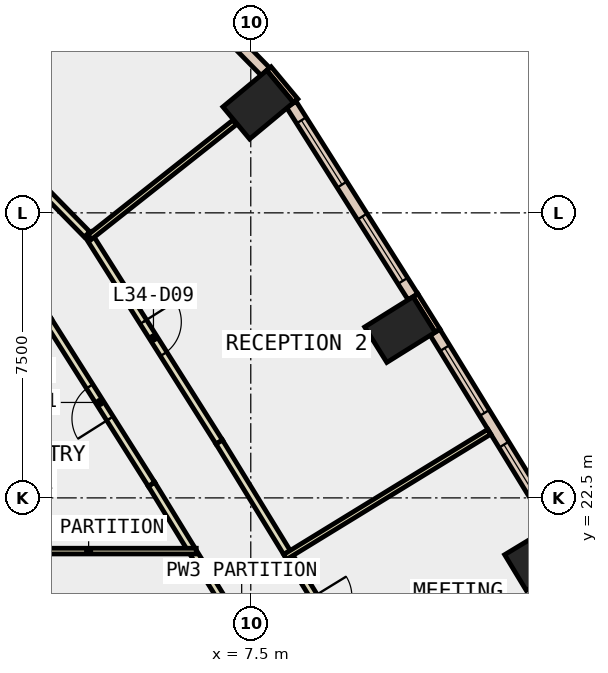
"""IFC4 building model, lengths in metres.
Left out: names, types, materials, properties, quantities, classifications, styles, units other than length and angle.
Written with IfcOpenShell. Run it as: python <this file> out.ifc"""

import sys

from ifc_helpers import new_model, si_unit, direction, frame, frame_2d, origin, origin_2d, place, context, subcontext, project, spatial, rectangle, extrude, element, fill, save


model = new_model("IFC4")
c1 = context("Model", 3, precision=1e-05, world=origin(), true_north=direction((0.0, 1.0)))
c2 = subcontext(c1, "Body", "Model", "MODEL_VIEW")
j1 = project(units=[si_unit("LENGTHUNIT", "METRE"), si_unit("PLANEANGLEUNIT", "RADIAN")], contexts=[c1])
p1 = place(None, origin())
s1 = spatial("IfcSite", under=j1, at=p1, CompositionType="ELEMENT")
p2 = place(p1, origin())
s2 = spatial("IfcBuilding", under=s1, at=p2, CompositionType="ELEMENT")
p3 = place(p2, frame((0.0, 0.0, 155.0)))
s3 = spatial("IfcBuildingStorey", under=s2, at=p3, CompositionType="ELEMENT", Elevation=155.0)
for number, where, z_axis, x_axis in (
    (1, (15.107, 20.923, -0.4), (0.0, 0.0, 1.0), (-0.518, 0.855, 0.0)),
    (2, (11.425, 26.928, -0.4), (0.0, 0.0, 1.0), (-0.53, 0.848, 0.0)),
    (3, (7.695, 32.845, -0.4), (0.0, 0.0, 1.0), (-0.639, 0.769, 0.0)),
):
    element("IfcColumn", number, at=place(p3, frame(where, z_axis=z_axis, x_axis=x_axis)), inside=s3, PredefinedType="COLUMN", context=c2, shape_type="SweptSolid", body=[
        extrude(rectangle(XDim=1.1, YDim=1.5, at=origin_2d()), origin(), (0.0, 0.0, 1.0), 4.2),
    ])
p4 = place(p3, frame((12.416, 26.899, 0.0), z_axis=(0.0, 0.0, 1.0), x_axis=(-0.529879262372, 0.848073090782, 0.0)))
e4 = element("IfcWall", 4, at=p4, inside=s3, PredefinedType="STANDARD", context=c2, shape_type="SweptSolid", body=[
    extrude(rectangle(XDim=1.1, YDim=0.15, at=frame_2d((0.55, 0.0))), origin(), (0.0, 0.0, 1.0), 3.8),
])
p5 = place(p3, frame((8.681, 32.949, 0.0), z_axis=(0.0, 0.0, 1.0), x_axis=(-0.639070205934, 0.769148406933, 0.0)))
e5 = element("IfcWall", 5, at=p5, inside=s3, PredefinedType="STANDARD", context=c2, shape_type="SweptSolid", body=[
    extrude(rectangle(XDim=1.1, YDim=0.15, at=frame_2d((0.55, 0.0))), origin(), (0.0, 0.0, 1.0), 3.8),
])
p6 = place(p3, frame((15.462, 21.779, 0.0), z_axis=(0.0, 0.0, 1.0), x_axis=(-0.522704272908, 0.852514072074, 0.0)))
e6 = element("IfcWall", 6, at=p6, inside=s3, PredefinedType="STANDARD", context=c2, shape_type="SweptSolid", body=[
    extrude(rectangle(XDim=5.958, YDim=0.3, at=frame_2d((2.979, 0.0))), origin(), (0.0, 0.0, 1.0), 3.8),
])
p7 = place(p6, frame((0.489, 0.0, 0.9)))
e7 = element("IfcOpeningElement", 7, at=p7, cuts=e6, PredefinedType="OPENING", context=c2, shape_type="SweptSolid", body=[
    extrude(rectangle(XDim=2.0, YDim=2.6, at=frame_2d((1.0, 1.3))), frame((0.0, 0.16, 0.0), z_axis=(0.0, -1.0, 0.0), x_axis=(1.0, 0.0, 0.0)), (0.0, 0.0, 1.0), 0.32),
])
p8 = place(p6, frame((3.468, 0.0, 0.9)))
e8 = element("IfcOpeningElement", 8, at=p8, cuts=e6, PredefinedType="OPENING", context=c2, shape_type="SweptSolid", body=[
    extrude(rectangle(XDim=2.0, YDim=2.6, at=frame_2d((1.0, 1.3))), frame((0.0, 0.16, 0.0), z_axis=(0.0, -1.0, 0.0), x_axis=(1.0, 0.0, 0.0)), (0.0, 0.0, 1.0), 0.32),
])
p9 = place(p3, frame((11.767, 27.79, 0.0), z_axis=(0.0, 0.0, 1.0), x_axis=(-0.534262775953, 0.845318452556, 0.0)))
e9 = element("IfcWall", 9, at=p9, inside=s3, PredefinedType="STANDARD", context=c2, shape_type="SweptSolid", body=[
    extrude(rectangle(XDim=5.992, YDim=0.3, at=frame_2d((2.996, 0.0))), origin(), (0.0, 0.0, 1.0), 3.8),
])
p10 = place(p9, frame((0.498, 0.0, 0.9)))
e10 = element("IfcOpeningElement", 10, at=p10, cuts=e9, PredefinedType="OPENING", context=c2, shape_type="SweptSolid", body=[
    extrude(rectangle(XDim=2.0, YDim=2.6, at=frame_2d((1.0, 1.3))), frame((0.0, 0.16, 0.0), z_axis=(0.0, -1.0, 0.0), x_axis=(1.0, 0.0, 0.0)), (0.0, 0.0, 1.0), 0.32),
])
p11 = place(p9, frame((3.494, 0.0, 0.9)))
e11 = element("IfcOpeningElement", 11, at=p11, cuts=e9, PredefinedType="OPENING", context=c2, shape_type="SweptSolid", body=[
    extrude(rectangle(XDim=2.0, YDim=2.6, at=frame_2d((1.0, 1.3))), frame((0.0, 0.16, 0.0), z_axis=(0.0, -1.0, 0.0), x_axis=(1.0, 0.0, 0.0)), (0.0, 0.0, 1.0), 0.32),
])
p12 = place(p3, frame((7.885, 33.717, 0.0), z_axis=(0.0, 0.0, 1.0), x_axis=(-0.7003170466, 0.713831936973, 0.0)))
e12 = element("IfcWall", 12, at=p12, inside=s3, PredefinedType="STANDARD", context=c2, shape_type="SweptSolid", body=[
    extrude(rectangle(XDim=3.775, YDim=0.3, at=frame_2d((1.888, 0.0))), origin(), (0.0, 0.0, 1.0), 3.8),
])
p13 = place(p12, frame((1.188, 0.0, 0.9)))
e13 = element("IfcOpeningElement", 13, at=p13, cuts=e12, PredefinedType="OPENING", context=c2, shape_type="SweptSolid", body=[
    extrude(rectangle(XDim=1.4, YDim=2.6, at=frame_2d((0.7, 1.3))), frame((0.0, 0.16, 0.0), z_axis=(0.0, -1.0, 0.0), x_axis=(1.0, 0.0, 0.0)), (0.0, 0.0, 1.0), 0.32),
])
p14 = place(p3, frame((8.516, 16.942, 0.0), z_axis=(0.0, 0.0, 1.0), x_axis=(-0.522865983217, 0.852414901086, 0.0)))
e14 = element("IfcWall", 14, at=p14, inside=s3, PredefinedType="PARTITIONING", context=c2, shape_type="SweptSolid", body=[
    extrude(rectangle(XDim=4.803, YDim=0.2, at=frame_2d((2.401, 0.0))), origin(), (0.0, 0.0, 1.0), 3.8),
])
p15 = place(p14, frame((1.901, 0.0, 0.0)))
e15 = element("IfcOpeningElement", 15, at=p15, cuts=e14, PredefinedType="OPENING", context=c2, shape_type="SweptSolid", body=[
    extrude(rectangle(XDim=1.0, YDim=2.1, at=frame_2d((0.5, 1.05))), frame((0.0, 0.11, 0.0), z_axis=(0.0, -1.0, 0.0), x_axis=(1.0, 0.0, 0.0)), (0.0, 0.0, 1.0), 0.22),
])
p16 = place(p3, frame((5.927, 21.164, 0.0), z_axis=(0.0, 0.0, 1.0), x_axis=(-0.522754838565, 0.852483066552, 0.0)))
e16 = element("IfcWall", 16, at=p16, inside=s3, PredefinedType="PARTITIONING", context=c2, shape_type="SweptSolid", body=[
    extrude(rectangle(XDim=1.99, YDim=0.2, at=frame_2d((0.995, 0.0))), origin(), (0.0, 0.0, 1.0), 3.8),
])
p17 = place(p3, frame((4.887, 22.86, 0.0), z_axis=(0.0, 0.0, 1.0), x_axis=(-0.534315942524, 0.845284847589, 0.0)))
e17 = element("IfcWall", 17, at=p17, inside=s3, PredefinedType="PARTITIONING", context=c2, shape_type="SweptSolid", body=[
    extrude(rectangle(XDim=5.091, YDim=0.2, at=frame_2d((2.545, 0.0))), origin(), (0.0, 0.0, 1.0), 3.8),
])
p18 = place(p17, frame((2.045, 0.0, 0.0)))
e18 = element("IfcOpeningElement", 18, at=p18, cuts=e17, PredefinedType="OPENING", context=c2, shape_type="SweptSolid", body=[
    extrude(rectangle(XDim=1.0, YDim=2.1, at=frame_2d((0.5, 1.05))), frame((0.0, 0.11, 0.0), z_axis=(0.0, -1.0, 0.0), x_axis=(1.0, 0.0, 0.0)), (0.0, 0.0, 1.0), 0.22),
])
p19 = place(p3, frame((8.53, 20.935, 0.0), z_axis=(0.0, 0.0, 1.0), x_axis=(0.522830634433, -0.852436582801, 0.0)))
e19 = element("IfcWall", 19, at=p19, inside=s3, PredefinedType="PARTITIONING", context=c2, shape_type="SweptSolid", body=[
    extrude(rectangle(XDim=3.41, YDim=0.2, at=frame_2d((1.705, 0.0))), origin(), (0.0, 0.0, 1.0), 3.8),
])
p20 = place(p19, frame((1.205, 0.0, 0.0)))
e20 = element("IfcOpeningElement", 20, at=p20, cuts=e19, PredefinedType="OPENING", context=c2, shape_type="SweptSolid", body=[
    extrude(rectangle(XDim=1.0, YDim=2.1, at=frame_2d((0.5, 1.05))), frame((0.0, 0.11, 0.0), z_axis=(0.0, -1.0, 0.0), x_axis=(1.0, 0.0, 0.0)), (0.0, 0.0, 1.0), 0.22),
])
p21 = place(p3, frame((3.209, 29.446, 0.0), z_axis=(0.0, 0.0, 1.0), x_axis=(0.534253865926, -0.845324083854, 0.0)))
e21 = element("IfcWall", 21, at=p21, inside=s3, PredefinedType="PARTITIONING", context=c2, shape_type="SweptSolid", body=[
    extrude(rectangle(XDim=6.478, YDim=0.2, at=frame_2d((3.239, 0.0))), origin(), (0.0, 0.0, 1.0), 3.8),
])
p22 = place(p21, frame((2.739, 0.0, 0.0)))
e22 = element("IfcOpeningElement", 22, at=p22, cuts=e21, PredefinedType="OPENING", context=c2, shape_type="SweptSolid", body=[
    extrude(rectangle(XDim=1.0, YDim=2.1, at=frame_2d((0.5, 1.05))), frame((0.0, 0.11, 0.0), z_axis=(0.0, -1.0, 0.0), x_axis=(1.0, 0.0, 0.0)), (0.0, 0.0, 1.0), 0.22),
])
p23 = place(p3, frame((6.67, 23.97, 0.0), z_axis=(0.0, 0.0, 1.0), x_axis=(0.522622501212, -0.85256420358, 0.0)))
e23 = element("IfcWall", 23, at=p23, inside=s3, PredefinedType="PARTITIONING", context=c2, shape_type="SweptSolid", body=[
    extrude(rectangle(XDim=3.41, YDim=0.2, at=frame_2d((1.705, 0.0))), origin(), (0.0, 0.0, 1.0), 3.8),
])
p24 = place(p3, frame((1.431, 31.228, 0.0), z_axis=(0.0, 0.0, 1.0), x_axis=(0.700326668838, -0.713822496783, 0.0)))
e24 = element("IfcWall", 24, at=p24, inside=s3, PredefinedType="PARTITIONING", context=c2, shape_type="SweptSolid", body=[
    extrude(rectangle(XDim=2.514, YDim=0.2, at=frame_2d((1.257, 0.0))), origin(), (0.0, 0.0, 1.0), 3.8),
])
p25 = place(p3, frame((0.4, 21.1, 0.0), z_axis=(0.0, 0.0, 1.0), x_axis=(1.0, 0.0, 0.0)))
e25 = element("IfcWall", 25, at=p25, inside=s3, PredefinedType="PARTITIONING", context=c2, shape_type="SweptSolid", body=[
    extrude(rectangle(XDim=5.666, YDim=0.15, at=frame_2d((2.833, 0.0))), origin(), (0.0, 0.0, 1.0), 3.8),
])
p26 = place(p3, frame((8.406, 20.947, 0.0), z_axis=(0.0, 0.0, 1.0), x_axis=(0.852529956042, 0.522678365777, 0.0)))
e26 = element("IfcWall", 26, at=p26, inside=s3, PredefinedType="PARTITIONING", context=c2, shape_type="SweptSolid", body=[
    extrude(rectangle(XDim=6.3, YDim=0.15, at=frame_2d((3.15, 0.0))), origin(), (0.0, 0.0, 1.0), 3.8),
])
p27 = place(p3, frame((3.262, 29.362, 0.0), z_axis=(0.0, 0.0, 1.0), x_axis=(0.78403972141, 0.620710653406, 0.0)))
e27 = element("IfcWall", 27, at=p27, inside=s3, PredefinedType="PARTITIONING", context=c2, shape_type="SweptSolid", body=[
    extrude(rectangle(XDim=4.867, YDim=0.15, at=frame_2d((2.434, 0.0))), origin(), (0.0, 0.0, 1.0), 3.8),
])
p28 = place(p7, origin())
e28 = element("IfcWindow", 28, at=p28, inside=s3, PartitioningType="SINGLE_PANEL", PredefinedType="WINDOW", context=c2, shape_type="SweptSolid", body=[
    extrude(rectangle(XDim=2.0, YDim=2.6, at=frame_2d((1.0, 1.3))), frame((0.0, 0.03, 0.0), z_axis=(0.0, -1.0, 0.0), x_axis=(1.0, 0.0, 0.0)), (0.0, 0.0, 1.0), 0.06),
])
fill(e7, e28)
p29 = place(p8, origin())
e29 = element("IfcWindow", 29, at=p29, inside=s3, PartitioningType="SINGLE_PANEL", PredefinedType="WINDOW", context=c2, shape_type="SweptSolid", body=[
    extrude(rectangle(XDim=2.0, YDim=2.6, at=frame_2d((1.0, 1.3))), frame((0.0, 0.03, 0.0), z_axis=(0.0, -1.0, 0.0), x_axis=(1.0, 0.0, 0.0)), (0.0, 0.0, 1.0), 0.06),
])
fill(e8, e29)
p30 = place(p10, origin())
e30 = element("IfcWindow", 30, at=p30, inside=s3, PartitioningType="SINGLE_PANEL", PredefinedType="WINDOW", context=c2, shape_type="SweptSolid", body=[
    extrude(rectangle(XDim=2.0, YDim=2.6, at=frame_2d((1.0, 1.3))), frame((0.0, 0.03, 0.0), z_axis=(0.0, -1.0, 0.0), x_axis=(1.0, 0.0, 0.0)), (0.0, 0.0, 1.0), 0.06),
])
fill(e10, e30)
p31 = place(p11, origin())
e31 = element("IfcWindow", 31, at=p31, inside=s3, PartitioningType="SINGLE_PANEL", PredefinedType="WINDOW", context=c2, shape_type="SweptSolid", body=[
    extrude(rectangle(XDim=2.0, YDim=2.6, at=frame_2d((1.0, 1.3))), frame((0.0, 0.03, 0.0), z_axis=(0.0, -1.0, 0.0), x_axis=(1.0, 0.0, 0.0)), (0.0, 0.0, 1.0), 0.06),
])
fill(e11, e31)
p32 = place(p22, origin())
e32 = element("IfcDoor", 32, at=p32, inside=s3, OperationType="SINGLE_SWING_LEFT", PredefinedType="DOOR", context=c2, shape_type="SweptSolid", body=[
    extrude(rectangle(XDim=1.0, YDim=2.1, at=frame_2d((0.5, 1.05))), frame((0.0, 0.025, 0.0), z_axis=(0.0, -1.0, 0.0), x_axis=(1.0, 0.0, 0.0)), (0.0, 0.0, 1.0), 0.05),
])
fill(e22, e32)
p33 = place(p18, origin())
e33 = element("IfcDoor", 33, at=p33, inside=s3, OperationType="SINGLE_SWING_LEFT", PredefinedType="DOOR", context=c2, shape_type="SweptSolid", body=[
    extrude(rectangle(XDim=1.0, YDim=2.1, at=frame_2d((0.5, 1.05))), frame((0.0, 0.025, 0.0), z_axis=(0.0, -1.0, 0.0), x_axis=(1.0, 0.0, 0.0)), (0.0, 0.0, 1.0), 0.05),
])
fill(e18, e33)
save(model, sys.argv[1])
